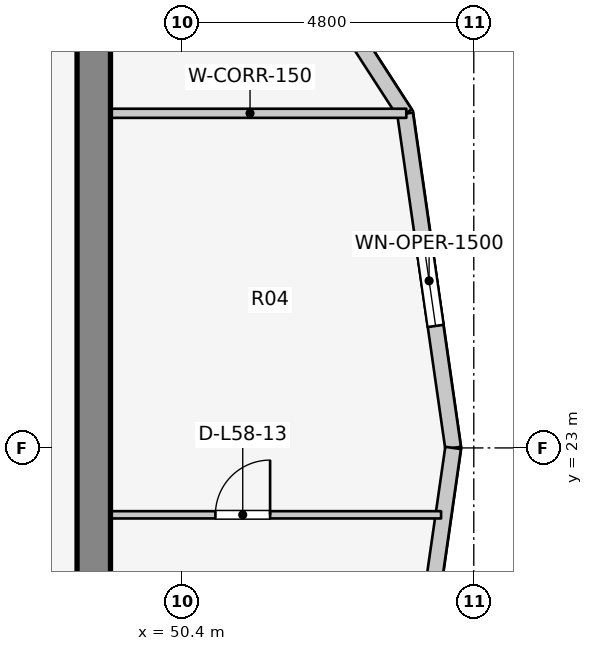
"""IFC4 building model, lengths in metres.
Left out: names, types, materials, properties, quantities, classifications, styles, units other than length and angle.
Written with IfcOpenShell. Run it as: python <this file> out.ifc"""

import sys

from ifc_helpers import new_model, si_unit, direction, frame, frame_2d, origin, place, context, subcontext, project, spatial, rectangle, extrude, element, fill, save


model = new_model("IFC4")
c1 = context("Model", 3, precision=1e-05, world=origin(), true_north=direction((0.0, 1.0)))
c2 = subcontext(c1, "Body", "Model", "MODEL_VIEW")
j1 = project(units=[si_unit("LENGTHUNIT", "METRE"), si_unit("PLANEANGLEUNIT", "RADIAN")], contexts=[c1])
p1 = place(None, origin())
s1 = spatial("IfcSite", under=j1, at=p1, CompositionType="ELEMENT")
p2 = place(p1, origin())
s2 = spatial("IfcBuilding", under=s1, at=p2, CompositionType="ELEMENT")
p3 = place(p2, frame((0.0, 0.0, 190.1)))
s3 = spatial("IfcBuildingStorey", under=s2, at=p3, CompositionType="ELEMENT", Elevation=190.1)
p4 = place(p3, frame((48.95, 17.05, 0.0), z_axis=(0.0, 0.0, 1.0), x_axis=(0.0, 1.0, 0.0)))
e1 = element("IfcWall", 1, at=p4, inside=s3, PredefinedType="SHEAR", context=c2, shape_type="SweptSolid", body=[
    extrude(rectangle(XDim=12.8, YDim=0.55, at=frame_2d((6.4, 0.0))), origin(), (0.0, 0.0, 1.0), 3.1),
])
p5 = place(p3, frame((54.86, 23.0, 0.0), z_axis=(0.0, 0.0, 1.0), x_axis=(-0.142227632286, 0.989833976288, 0.0)))
e2 = element("IfcWall", 2, at=p5, inside=s3, PredefinedType="STANDARD", context=c2, shape_type="SweptSolid", body=[
    extrude(rectangle(XDim=5.553, YDim=0.26, at=frame_2d((2.776, 0.0))), origin(), (0.0, 0.0, 1.0), 2.57),
])
p6 = place(p5, frame((2.027, 0.0, 0.75)))
e3 = element("IfcOpeningElement", 3, at=p6, cuts=e2, PredefinedType="OPENING", context=c2, shape_type="SweptSolid", body=[
    extrude(rectangle(XDim=1.5, YDim=1.6, at=frame_2d((0.75, 0.8))), frame((0.0, 0.14, 0.0), z_axis=(0.0, -1.0, 0.0), x_axis=(1.0, 0.0, 0.0)), (0.0, 0.0, 1.0), 0.28),
])
p7 = place(p3, frame((54.07, 28.497, 0.0), z_axis=(0.0, 0.0, 1.0), x_axis=(-0.543358984534, 0.839500454989, 0.0)))
e4 = element("IfcWall", 4, at=p7, inside=s3, PredefinedType="STANDARD", context=c2, shape_type="SweptSolid", body=[
    extrude(rectangle(XDim=4.511, YDim=0.26, at=frame_2d((2.256, 0.0))), origin(), (0.0, 0.0, 1.0), 1.22),
])
p8 = place(p7, frame((1.656, 0.0, 0.15)))
e5 = element("IfcOpeningElement", 5, at=p8, cuts=e4, PredefinedType="OPENING", context=c2, shape_type="SweptSolid", body=[
    extrude(rectangle(XDim=1.2, YDim=0.9, at=frame_2d((0.6, 0.45))), frame((0.0, 0.14, 0.0), z_axis=(0.0, -1.0, 0.0), x_axis=(1.0, 0.0, 0.0)), (0.0, 0.0, 1.0), 0.28),
])
p9 = place(p3, frame((54.07, 17.503, 0.0), z_axis=(0.0, 0.0, 1.0), x_axis=(0.142227632286, 0.989833976288, 0.0)))
e6 = element("IfcWall", 6, at=p9, inside=s3, PredefinedType="STANDARD", context=c2, shape_type="SweptSolid", body=[
    extrude(rectangle(XDim=5.553, YDim=0.26, at=frame_2d((2.776, 0.0))), origin(), (0.0, 0.0, 1.0), 2.57),
])
p10 = place(p9, frame((1.646, 0.0, 0.75)))
e7 = element("IfcOpeningElement", 7, at=p10, cuts=e6, PredefinedType="OPENING", context=c2, shape_type="SweptSolid", body=[
    extrude(rectangle(XDim=1.2, YDim=1.5, at=frame_2d((0.6, 0.75))), frame((0.0, 0.14, 0.0), z_axis=(0.0, -1.0, 0.0), x_axis=(1.0, 0.0, 0.0)), (0.0, 0.0, 1.0), 0.28),
])
p11 = place(p3, frame((48.95, 28.503, 0.0), z_axis=(0.0, 0.0, 1.0), x_axis=(1.0, 0.0, 0.0)))
e8 = element("IfcWall", 8, at=p11, inside=s3, PredefinedType="PARTITIONING", context=c2, shape_type="SweptSolid", body=[
    extrude(rectangle(XDim=5.14, YDim=0.15, at=frame_2d((2.57, 0.0))), origin(), (0.0, 0.0, 1.0), 2.575),
])
p12 = place(p3, frame((48.95, 21.9, 0.0), z_axis=(0.0, 0.0, 1.0), x_axis=(1.0, 0.0, 0.0)))
e9 = element("IfcWall", 9, at=p12, inside=s3, PredefinedType="MOVABLE", context=c2, shape_type="SweptSolid", body=[
    extrude(rectangle(XDim=5.712, YDim=0.12, at=frame_2d((2.856, 0.0))), origin(), (0.0, 0.0, 1.0), 2.575),
])
p13 = place(p12, frame((2.0, 0.0, 0.0)))
e10 = element("IfcOpeningElement", 10, at=p13, cuts=e9, PredefinedType="OPENING", context=c2, shape_type="SweptSolid", body=[
    extrude(rectangle(XDim=0.9, YDim=2.1, at=frame_2d((0.45, 1.05))), frame((0.0, 0.07, 0.0), z_axis=(0.0, -1.0, 0.0), x_axis=(1.0, 0.0, 0.0)), (0.0, 0.0, 1.0), 0.14),
])
p14 = place(p6, origin())
e11 = element("IfcWindow", 11, at=p14, inside=s3, PartitioningType="SINGLE_PANEL", PredefinedType="WINDOW", context=c2, shape_type="SweptSolid", body=[
    extrude(rectangle(XDim=1.5, YDim=1.6, at=frame_2d((0.75, 0.8))), frame((0.0, 0.03, 0.0), z_axis=(0.0, -1.0, 0.0), x_axis=(1.0, 0.0, 0.0)), (0.0, 0.0, 1.0), 0.06),
])
fill(e3, e11)
p15 = place(p13, origin())
e12 = element("IfcDoor", 12, at=p15, inside=s3, OperationType="SINGLE_SWING_RIGHT", PredefinedType="DOOR", context=c2, shape_type="SweptSolid", body=[
    extrude(rectangle(XDim=0.9, YDim=2.1, at=frame_2d((0.45, 1.05))), frame((0.0, 0.025, 0.0), z_axis=(0.0, -1.0, 0.0), x_axis=(1.0, 0.0, 0.0)), (0.0, 0.0, 1.0), 0.05),
])
fill(e10, e12)
save(model, sys.argv[1])
